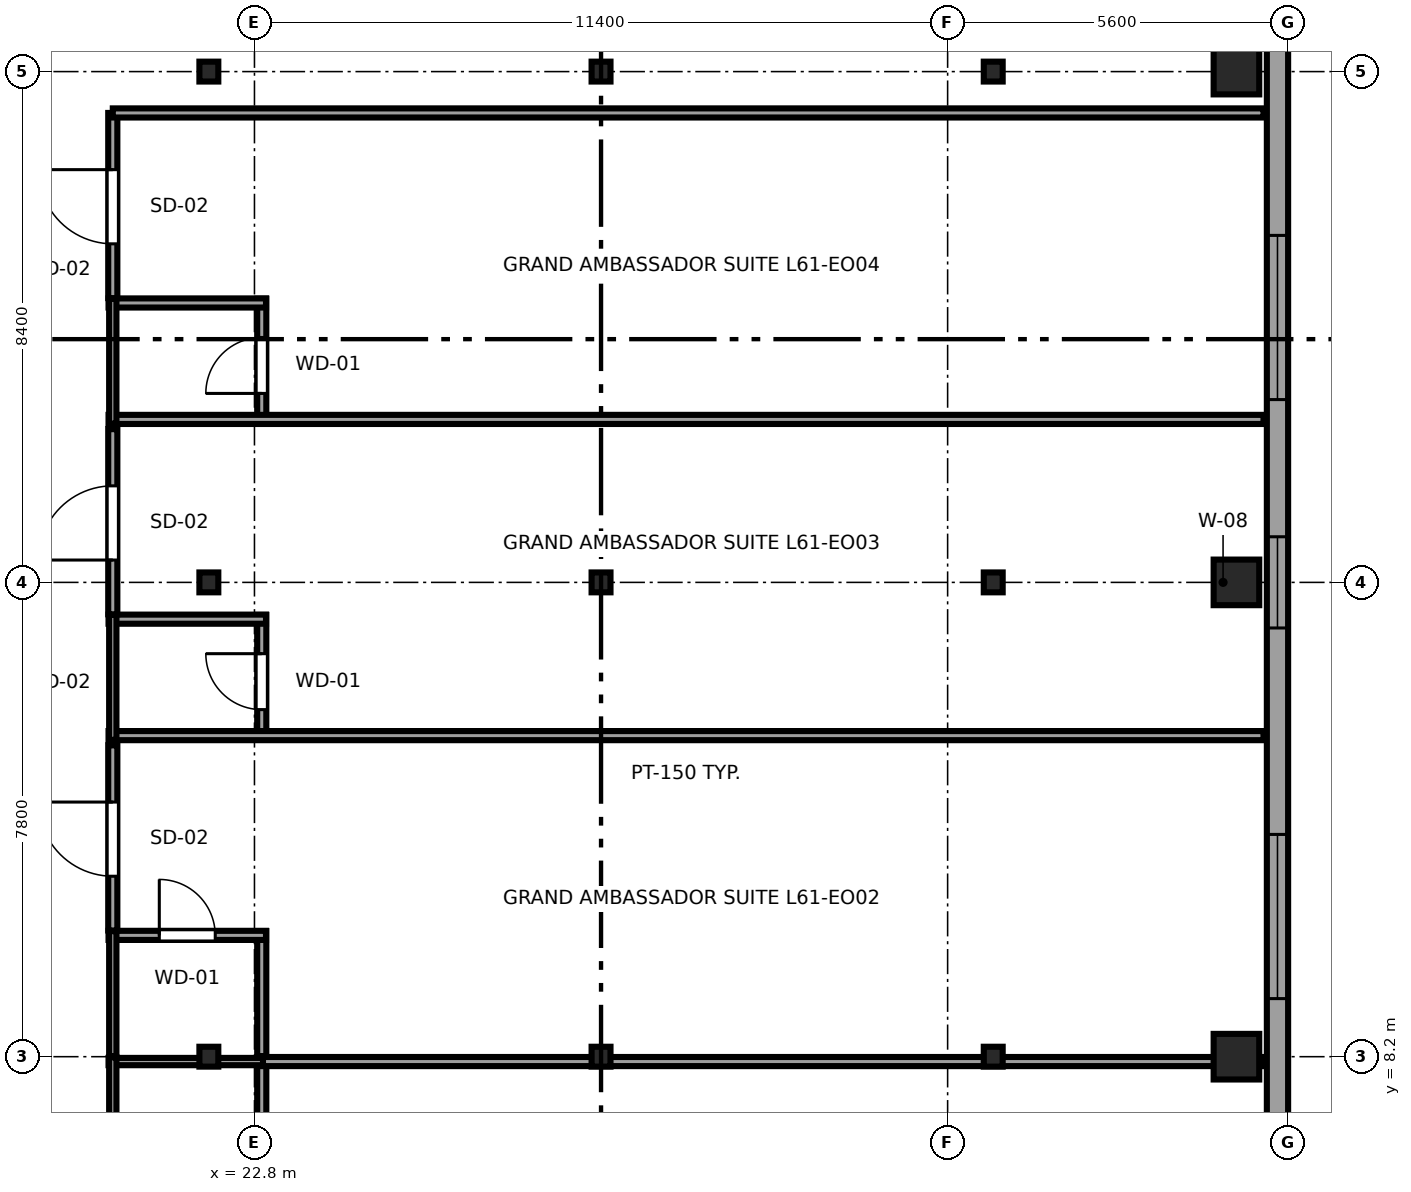
"""IFC4 building model, lengths in metres.
Left out: names, types, materials, properties, quantities, classifications, styles, units other than length and angle.
Written with IfcOpenShell. Run it as: python <this file> out.ifc"""

import sys

from ifc_helpers import new_model, si_unit, direction, frame, frame_2d, origin, origin_2d, place, context, subcontext, project, spatial, rectangle, i_section, extrude, source, transform, mapped, element, fill, save


model = new_model("IFC4")
c1 = context("Model", 3, precision=1e-05, world=origin(), true_north=direction((0.0, 1.0)))
c2 = subcontext(c1, "Body", "Model", "MODEL_VIEW")
j1 = project(units=[si_unit("LENGTHUNIT", "METRE"), si_unit("PLANEANGLEUNIT", "RADIAN")], contexts=[c1])
p1 = place(None, origin())
s1 = spatial("IfcSite", under=j1, at=p1, CompositionType="ELEMENT")
p2 = place(p1, origin())
s2 = spatial("IfcBuilding", under=s1, at=p2, CompositionType="ELEMENT")
p3 = place(p2, frame((0.0, 0.0, 231.0)))
s3 = spatial("IfcBuildingStorey", under=s2, at=p3, CompositionType="ELEMENT", Elevation=231.0)
m1 = source(origin(), c2, "Body", "SweptSolid", [
    extrude(i_section(OverallWidth=0.311, OverallDepth=0.327, WebThickness=0.016, FlangeThickness=0.025, FilletRadius=0.017, at=origin_2d()), origin(), (0.0, 0.0, 1.0), 3.55),
])
for number, where, z_axis, x_axis in (
    (1, (22.05, 8.2, 0.0), (0.0, 0.0, 1.0), (1.0, 0.0, 0.0)),
    (2, (22.05, 16.0, 0.0), (0.0, 0.0, 1.0), (1.0, 0.0, 0.0)),
    (3, (22.05, 24.4, 0.0), (0.0, 0.0, 1.0), (1.0, 0.0, 0.0)),
    (4, (28.5, 8.2, 0.0), (0.0, 0.0, 1.0), (1.0, 0.0, 0.0)),
    (5, (28.5, 16.0, 0.0), (0.0, 0.0, 1.0), (1.0, 0.0, 0.0)),
    (6, (28.5, 24.4, 0.0), (0.0, 0.0, 1.0), (1.0, 0.0, 0.0)),
    (7, (34.95, 8.2, 0.0), (0.0, 0.0, 1.0), (1.0, 0.0, 0.0)),
    (8, (34.95, 16.0, 0.0), (0.0, 0.0, 1.0), (1.0, 0.0, 0.0)),
    (9, (34.95, 24.4, 0.0), (0.0, 0.0, 1.0), (1.0, 0.0, 0.0)),
):
    element("IfcColumn", number, at=place(p3, frame(where, z_axis=z_axis, x_axis=x_axis)), inside=s3, PredefinedType="COLUMN", context=c2, shape_type="MappedRepresentation", body=[
        mapped(m1, transform((0.0, 0.0, 0.0), x_axis=(1.0, 0.0, 0.0), y_axis=(0.0, 1.0, 0.0), z_axis=(0.0, 0.0, 1.0), scale=1.0)),
    ])
m2 = source(origin(), c2, "Body", "SweptSolid", [
    extrude(rectangle(XDim=0.75, YDim=0.75, at=origin_2d()), origin(), (0.0, 0.0, 1.0), 3.55),
])
for number, where, z_axis, x_axis in (
    (10, (38.95, 8.2, 0.0), (0.0, 0.0, 1.0), (1.0, 0.0, 0.0)),
    (11, (38.95, 16.0, 0.0), (0.0, 0.0, 1.0), (1.0, 0.0, 0.0)),
    (12, (38.95, 24.4, 0.0), (0.0, 0.0, 1.0), (1.0, 0.0, 0.0)),
):
    element("IfcColumn", number, at=place(p3, frame(where, z_axis=z_axis, x_axis=x_axis)), inside=s3, PredefinedType="COLUMN", context=c2, shape_type="MappedRepresentation", body=[
        mapped(m2, transform((0.0, 0.0, 0.0), x_axis=(1.0, 0.0, 0.0), y_axis=(0.0, 1.0, 0.0), z_axis=(0.0, 0.0, 1.0), scale=1.0)),
    ])
p4 = place(p3, frame((39.625, 7.017, 0.0), z_axis=(0.0, 0.0, 1.0), x_axis=(0.0, 1.0, 0.0)))
e13 = element("IfcWall", 13, at=p4, inside=s3, PredefinedType="SOLIDWALL", context=c2, shape_type="SweptSolid", body=[
    extrude(rectangle(XDim=24.579, YDim=0.35, at=frame_2d((12.29, 0.0))), origin(), (0.0, 0.0, 1.0), 3.37),
])
p5 = place(p4, frame((2.138, 0.0, 0.68)))
e14 = element("IfcOpeningElement", 14, at=p5, cuts=e13, PredefinedType="OPENING", context=c2, shape_type="SweptSolid", body=[
    extrude(rectangle(XDim=2.7, YDim=1.95, at=frame_2d((1.35, 0.975))), frame((0.0, 0.185, 0.0), z_axis=(0.0, -1.0, 0.0), x_axis=(1.0, 0.0, 0.0)), (0.0, 0.0, 1.0), 0.37),
])
p6 = place(p4, frame((11.989, 0.0, 0.68)))
e15 = element("IfcOpeningElement", 15, at=p6, cuts=e13, PredefinedType="OPENING", context=c2, shape_type="SweptSolid", body=[
    extrude(rectangle(XDim=2.7, YDim=1.95, at=frame_2d((1.35, 0.975))), frame((0.0, 0.185, 0.0), z_axis=(0.0, -1.0, 0.0), x_axis=(1.0, 0.0, 0.0)), (0.0, 0.0, 1.0), 0.37),
])
p7 = place(p4, frame((20.291, 0.0, 0.68)))
e16 = element("IfcOpeningElement", 16, at=p7, cuts=e13, PredefinedType="OPENING", context=c2, shape_type="SweptSolid", body=[
    extrude(rectangle(XDim=2.7, YDim=1.95, at=frame_2d((1.35, 0.975))), frame((0.0, 0.185, 0.0), z_axis=(0.0, -1.0, 0.0), x_axis=(1.0, 0.0, 0.0)), (0.0, 0.0, 1.0), 0.37),
])
p8 = place(p4, frame((8.233, 0.0, 0.62)))
e17 = element("IfcOpeningElement", 17, at=p8, cuts=e13, PredefinedType="OPENING", context=c2, shape_type="SweptSolid", body=[
    extrude(rectangle(XDim=1.5, YDim=1.55, at=frame_2d((0.75, 0.775))), frame((0.0, 0.185, 0.0), z_axis=(0.0, -1.0, 0.0), x_axis=(1.0, 0.0, 0.0)), (0.0, 0.0, 1.0), 0.37),
])
p9 = place(p3, frame((22.92, 6.135, 0.0), z_axis=(0.0, 0.0, 1.0), x_axis=(0.0, 1.0, 0.0)))
e18 = element("IfcWall", 18, at=p9, inside=s3, PredefinedType="PARTITIONING", context=c2, shape_type="SweptSolid", body=[
    extrude(rectangle(XDim=2.055, YDim=0.15, at=frame_2d((1.027, 0.0))), origin(), (0.0, 0.0, 1.0), 3.37),
])
p10 = place(p3, frame((20.4, 8.12, 0.0), z_axis=(0.0, 0.0, 1.0), x_axis=(1.0, 0.0, 0.0)))
e19 = element("IfcWall", 19, at=p10, inside=s3, PredefinedType="PLUMBINGWALL", context=c2, shape_type="SweptSolid", body=[
    extrude(rectangle(XDim=2.59, YDim=0.12, at=frame_2d((1.295, 0.0))), origin(), (0.0, 0.0, 1.0), 2.758),
])
p11 = place(p3, frame((20.47, 6.135, 0.0), z_axis=(0.0, 0.0, 1.0), x_axis=(0.0, 1.0, 0.0)))
e20 = element("IfcWall", 20, at=p11, inside=s3, PredefinedType="PLUMBINGWALL", context=c2, shape_type="SweptSolid", body=[
    extrude(rectangle(XDim=2.055, YDim=0.12, at=frame_2d((1.027, 0.0))), origin(), (0.0, 0.0, 1.0), 3.37),
])
p12 = place(p3, frame((22.92, 8.21, 0.0), z_axis=(0.0, 0.0, 1.0), x_axis=(0.0, 1.0, 0.0)))
e21 = element("IfcWall", 21, at=p12, inside=s3, PredefinedType="PARTITIONING", context=c2, shape_type="SweptSolid", body=[
    extrude(rectangle(XDim=2.055, YDim=0.15, at=frame_2d((1.027, 0.0))), origin(), (0.0, 0.0, 1.0), 3.37),
])
p13 = place(p3, frame((20.4, 10.195, 0.0), z_axis=(0.0, 0.0, 1.0), x_axis=(1.0, 0.0, 0.0)))
e22 = element("IfcWall", 22, at=p13, inside=s3, PredefinedType="PARTITIONING", context=c2, shape_type="SweptSolid", body=[
    extrude(rectangle(XDim=2.59, YDim=0.15, at=frame_2d((1.295, 0.0))), origin(), (0.0, 0.0, 1.0), 3.37),
])
p14 = place(p13, frame((0.835, 0.0, 0.0)))
e23 = element("IfcOpeningElement", 23, at=p14, cuts=e22, PredefinedType="OPENING", context=c2, shape_type="SweptSolid", body=[
    extrude(rectangle(XDim=0.92, YDim=2.01, at=frame_2d((0.46, 1.005))), frame((0.0, 0.085, 0.0), z_axis=(0.0, -1.0, 0.0), x_axis=(1.0, 0.0, 0.0)), (0.0, 0.0, 1.0), 0.17),
])
p15 = place(p3, frame((20.47, 8.21, 0.0), z_axis=(0.0, 0.0, 1.0), x_axis=(0.0, 1.0, 0.0)))
e24 = element("IfcWall", 24, at=p15, inside=s3, PredefinedType="PLUMBINGWALL", context=c2, shape_type="SweptSolid", body=[
    extrude(rectangle(XDim=2.055, YDim=0.12, at=frame_2d((1.027, 0.0))), origin(), (0.0, 0.0, 1.0), 3.37),
])
p16 = place(p3, frame((22.92, 13.41, 0.0), z_axis=(0.0, 0.0, 1.0), x_axis=(0.0, 1.0, 0.0)))
e25 = element("IfcWall", 25, at=p16, inside=s3, PredefinedType="PARTITIONING", context=c2, shape_type="SweptSolid", body=[
    extrude(rectangle(XDim=2.055, YDim=0.15, at=frame_2d((1.028, 0.0))), origin(), (0.0, 0.0, 1.0), 3.37),
])
p17 = place(p16, frame((0.498, 0.0, 0.0)))
e26 = element("IfcOpeningElement", 26, at=p17, cuts=e25, PredefinedType="OPENING", context=c2, shape_type="SweptSolid", body=[
    extrude(rectangle(XDim=0.92, YDim=2.01, at=frame_2d((0.46, 1.005))), frame((0.0, 0.085, 0.0), z_axis=(0.0, -1.0, 0.0), x_axis=(1.0, 0.0, 0.0)), (0.0, 0.0, 1.0), 0.17),
])
p18 = place(p3, frame((20.4, 13.48, 0.0), z_axis=(0.0, 0.0, 1.0), x_axis=(1.0, 0.0, 0.0)))
e27 = element("IfcWall", 27, at=p18, inside=s3, PredefinedType="PARTITIONING", context=c2, shape_type="SweptSolid", body=[
    extrude(rectangle(XDim=18.995, YDim=0.15, at=frame_2d((9.498, 0.0))), origin(), (0.0, 0.0, 1.0), 3.37),
])
p19 = place(p3, frame((20.4, 15.395, 0.0), z_axis=(0.0, 0.0, 1.0), x_axis=(1.0, 0.0, 0.0)))
e28 = element("IfcWall", 28, at=p19, inside=s3, PredefinedType="PARTITIONING", context=c2, shape_type="SweptSolid", body=[
    extrude(rectangle(XDim=2.59, YDim=0.15, at=frame_2d((1.295, 0.0))), origin(), (0.0, 0.0, 1.0), 3.37),
])
p20 = place(p3, frame((20.47, 13.41, 0.0), z_axis=(0.0, 0.0, 1.0), x_axis=(0.0, 1.0, 0.0)))
e29 = element("IfcWall", 29, at=p20, inside=s3, PredefinedType="PLUMBINGWALL", context=c2, shape_type="SweptSolid", body=[
    extrude(rectangle(XDim=2.055, YDim=0.12, at=frame_2d((1.028, 0.0))), origin(), (0.0, 0.0, 1.0), 3.37),
])
p21 = place(p3, frame((22.92, 18.61, 0.0), z_axis=(0.0, 0.0, 1.0), x_axis=(0.0, 1.0, 0.0)))
e30 = element("IfcWall", 30, at=p21, inside=s3, PredefinedType="PARTITIONING", context=c2, shape_type="SweptSolid", body=[
    extrude(rectangle(XDim=2.055, YDim=0.15, at=frame_2d((1.027, 0.0))), origin(), (0.0, 0.0, 1.0), 3.37),
])
p22 = place(p21, frame((0.498, 0.0, 0.0)))
e31 = element("IfcOpeningElement", 31, at=p22, cuts=e30, PredefinedType="OPENING", context=c2, shape_type="SweptSolid", body=[
    extrude(rectangle(XDim=0.92, YDim=2.01, at=frame_2d((0.46, 1.005))), frame((0.0, 0.085, 0.0), z_axis=(0.0, -1.0, 0.0), x_axis=(1.0, 0.0, 0.0)), (0.0, 0.0, 1.0), 0.17),
])
p23 = place(p3, frame((20.4, 18.68, 0.0), z_axis=(0.0, 0.0, 1.0), x_axis=(1.0, 0.0, 0.0)))
e32 = element("IfcWall", 32, at=p23, inside=s3, PredefinedType="PARTITIONING", context=c2, shape_type="SweptSolid", body=[
    extrude(rectangle(XDim=18.995, YDim=0.15, at=frame_2d((9.498, 0.0))), origin(), (0.0, 0.0, 1.0), 3.37),
])
p24 = place(p3, frame((20.4, 20.595, 0.0), z_axis=(0.0, 0.0, 1.0), x_axis=(1.0, 0.0, 0.0)))
e33 = element("IfcWall", 33, at=p24, inside=s3, PredefinedType="PARTITIONING", context=c2, shape_type="SweptSolid", body=[
    extrude(rectangle(XDim=2.59, YDim=0.15, at=frame_2d((1.295, 0.0))), origin(), (0.0, 0.0, 1.0), 3.37),
])
p25 = place(p3, frame((20.47, 18.61, 0.0), z_axis=(0.0, 0.0, 1.0), x_axis=(0.0, 1.0, 0.0)))
e34 = element("IfcWall", 34, at=p25, inside=s3, PredefinedType="PLUMBINGWALL", context=c2, shape_type="SweptSolid", body=[
    extrude(rectangle(XDim=2.055, YDim=0.12, at=frame_2d((1.027, 0.0))), origin(), (0.0, 0.0, 1.0), 3.37),
])
p26 = place(p3, frame((22.94, 8.12, 0.0), z_axis=(0.0, 0.0, 1.0), x_axis=(1.0, 0.0, 0.0)))
e35 = element("IfcWall", 35, at=p26, inside=s3, PredefinedType="PARTITIONING", context=c2, shape_type="SweptSolid", body=[
    extrude(rectangle(XDim=16.455, YDim=0.15, at=frame_2d((8.228, 0.0))), origin(), (0.0, 0.0, 1.0), 2.758),
])
p27 = place(p3, frame((20.47, 10.275, 0.0), z_axis=(0.0, 0.0, 1.0), x_axis=(0.0, 1.0, 0.0)))
e36 = element("IfcWall", 36, at=p27, inside=s3, PredefinedType="PARTITIONING", context=c2, shape_type="SweptSolid", body=[
    extrude(rectangle(XDim=3.045, YDim=0.15, at=frame_2d((1.522, 0.0))), origin(), (0.0, 0.0, 1.0), 3.37),
])
p28 = place(p27, frame((0.893, 0.0, 0.0)))
e37 = element("IfcOpeningElement", 37, at=p28, cuts=e36, PredefinedType="OPENING", context=c2, shape_type="SweptSolid", body=[
    extrude(rectangle(XDim=1.22, YDim=2.08, at=frame_2d((0.61, 1.04))), frame((0.0, 0.085, 0.0), z_axis=(0.0, -1.0, 0.0), x_axis=(1.0, 0.0, 0.0)), (0.0, 0.0, 1.0), 0.17),
])
p29 = place(p3, frame((20.47, 15.475, 0.0), z_axis=(0.0, 0.0, 1.0), x_axis=(0.0, 1.0, 0.0)))
e38 = element("IfcWall", 38, at=p29, inside=s3, PredefinedType="PARTITIONING", context=c2, shape_type="SweptSolid", body=[
    extrude(rectangle(XDim=3.045, YDim=0.15, at=frame_2d((1.522, 0.0))), origin(), (0.0, 0.0, 1.0), 3.37),
])
p30 = place(p29, frame((0.893, 0.0, 0.0)))
e39 = element("IfcOpeningElement", 39, at=p30, cuts=e38, PredefinedType="OPENING", context=c2, shape_type="SweptSolid", body=[
    extrude(rectangle(XDim=1.22, YDim=2.08, at=frame_2d((0.61, 1.04))), frame((0.0, 0.085, 0.0), z_axis=(0.0, -1.0, 0.0), x_axis=(1.0, 0.0, 0.0)), (0.0, 0.0, 1.0), 0.17),
])
p31 = place(p3, frame((20.47, 20.675, 0.0), z_axis=(0.0, 0.0, 1.0), x_axis=(0.0, 1.0, 0.0)))
e40 = element("IfcWall", 40, at=p31, inside=s3, PredefinedType="PARTITIONING", context=c2, shape_type="SweptSolid", body=[
    extrude(rectangle(XDim=3.045, YDim=0.15, at=frame_2d((1.522, 0.0))), origin(), (0.0, 0.0, 1.0), 3.37),
])
p32 = place(p31, frame((0.893, 0.0, 0.0)))
e41 = element("IfcOpeningElement", 41, at=p32, cuts=e40, PredefinedType="OPENING", context=c2, shape_type="SweptSolid", body=[
    extrude(rectangle(XDim=1.22, YDim=2.08, at=frame_2d((0.61, 1.04))), frame((0.0, 0.085, 0.0), z_axis=(0.0, -1.0, 0.0), x_axis=(1.0, 0.0, 0.0)), (0.0, 0.0, 1.0), 0.17),
])
p33 = place(p3, frame((20.47, 23.72, 0.0), z_axis=(0.0, 0.0, 1.0), x_axis=(1.0, 0.0, 0.0)))
e42 = element("IfcWall", 42, at=p33, inside=s3, PredefinedType="PARTITIONING", context=c2, shape_type="SweptSolid", body=[
    extrude(rectangle(XDim=18.925, YDim=0.15, at=frame_2d((9.462, 0.0))), origin(), (0.0, 0.0, 1.0), 3.37),
])
m3 = source(origin(), c2, "Body", "SweptSolid", [
    extrude(rectangle(XDim=2.7, YDim=1.95, at=frame_2d((1.35, 0.975))), frame((0.0, 0.09, 0.0), z_axis=(0.0, -1.0, 0.0), x_axis=(1.0, 0.0, 0.0)), (0.0, 0.0, 1.0), 0.06),
])
p34 = place(p5, origin())
e43 = element("IfcWindow", 43, at=p34, inside=s3, PartitioningType="TRIPLE_PANEL_HORIZONTAL", PredefinedType="WINDOW", context=c2, shape_type="MappedRepresentation", body=[
    mapped(m3, transform((0.0, 0.0, 0.0), x_axis=(1.0, 0.0, 0.0), y_axis=(0.0, 1.0, 0.0), z_axis=(0.0, 0.0, 1.0), scale=1.0)),
])
fill(e14, e43)
p35 = place(p6, origin())
e44 = element("IfcWindow", 44, at=p35, inside=s3, PartitioningType="TRIPLE_PANEL_HORIZONTAL", PredefinedType="WINDOW", context=c2, shape_type="MappedRepresentation", body=[
    mapped(m3, transform((0.0, 0.0, 0.0), x_axis=(1.0, 0.0, 0.0), y_axis=(0.0, 1.0, 0.0), z_axis=(0.0, 0.0, 1.0), scale=1.0)),
])
fill(e15, e44)
m4 = source(origin(), c2, "Body", "SweptSolid", [
    extrude(rectangle(XDim=1.5, YDim=1.55, at=frame_2d((0.75, 0.775))), frame((0.0, 0.09, 0.0), z_axis=(0.0, -1.0, 0.0), x_axis=(1.0, 0.0, 0.0)), (0.0, 0.0, 1.0), 0.06),
])
p36 = place(p8, origin())
e45 = element("IfcWindow", 45, at=p36, inside=s3, PartitioningType="SINGLE_PANEL", PredefinedType="WINDOW", context=c2, shape_type="MappedRepresentation", body=[
    mapped(m4, transform((0.0, 0.0, 0.0), x_axis=(1.0, 0.0, 0.0), y_axis=(0.0, 1.0, 0.0), z_axis=(0.0, 0.0, 1.0), scale=1.0)),
])
fill(e17, e45)
m5 = source(origin(), c2, "Body", "SweptSolid", [
    extrude(rectangle(XDim=0.92, YDim=2.01, at=frame_2d((0.46, 1.005))), frame((0.0, 0.025, 0.0), z_axis=(0.0, -1.0, 0.0), x_axis=(1.0, 0.0, 0.0)), (0.0, 0.0, 1.0), 0.05),
])
p37 = place(p14, origin())
e46 = element("IfcDoor", 46, at=p37, inside=s3, OperationType="SINGLE_SWING_LEFT", PredefinedType="DOOR", context=c2, shape_type="MappedRepresentation", body=[
    mapped(m5, transform((0.0, 0.0, 0.0), x_axis=(1.0, 0.0, 0.0), y_axis=(0.0, 1.0, 0.0), z_axis=(0.0, 0.0, 1.0), scale=1.0)),
])
fill(e23, e46)
p38 = place(p17, origin())
e47 = element("IfcDoor", 47, at=p38, inside=s3, OperationType="SINGLE_SWING_RIGHT", PredefinedType="DOOR", context=c2, shape_type="MappedRepresentation", body=[
    mapped(m5, transform((0.0, 0.0, 0.0), x_axis=(1.0, 0.0, 0.0), y_axis=(0.0, 1.0, 0.0), z_axis=(0.0, 0.0, 1.0), scale=1.0)),
])
fill(e26, e47)
p39 = place(p22, origin())
e48 = element("IfcDoor", 48, at=p39, inside=s3, OperationType="SINGLE_SWING_LEFT", PredefinedType="DOOR", context=c2, shape_type="MappedRepresentation", body=[
    mapped(m5, transform((0.0, 0.0, 0.0), x_axis=(1.0, 0.0, 0.0), y_axis=(0.0, 1.0, 0.0), z_axis=(0.0, 0.0, 1.0), scale=1.0)),
])
fill(e31, e48)
m6 = source(origin(), c2, "Body", "SweptSolid", [
    extrude(rectangle(XDim=1.22, YDim=2.08, at=frame_2d((0.61, 1.04))), frame((0.0, 0.025, 0.0), z_axis=(0.0, -1.0, 0.0), x_axis=(1.0, 0.0, 0.0)), (0.0, 0.0, 1.0), 0.05),
])
p40 = place(p28, origin())
e49 = element("IfcDoor", 49, at=p40, inside=s3, OperationType="SINGLE_SWING_RIGHT", PredefinedType="DOOR", context=c2, shape_type="MappedRepresentation", body=[
    mapped(m6, transform((0.0, 0.0, 0.0), x_axis=(1.0, 0.0, 0.0), y_axis=(0.0, 1.0, 0.0), z_axis=(0.0, 0.0, 1.0), scale=1.0)),
])
fill(e37, e49)
p41 = place(p30, origin())
e50 = element("IfcDoor", 50, at=p41, inside=s3, OperationType="SINGLE_SWING_LEFT", PredefinedType="DOOR", context=c2, shape_type="MappedRepresentation", body=[
    mapped(m6, transform((0.0, 0.0, 0.0), x_axis=(1.0, 0.0, 0.0), y_axis=(0.0, 1.0, 0.0), z_axis=(0.0, 0.0, 1.0), scale=1.0)),
])
fill(e39, e50)
p42 = place(p32, origin())
e51 = element("IfcDoor", 51, at=p42, inside=s3, OperationType="SINGLE_SWING_RIGHT", PredefinedType="DOOR", context=c2, shape_type="MappedRepresentation", body=[
    mapped(m6, transform((0.0, 0.0, 0.0), x_axis=(1.0, 0.0, 0.0), y_axis=(0.0, 1.0, 0.0), z_axis=(0.0, 0.0, 1.0), scale=1.0)),
])
fill(e41, e51)
save(model, sys.argv[1])
